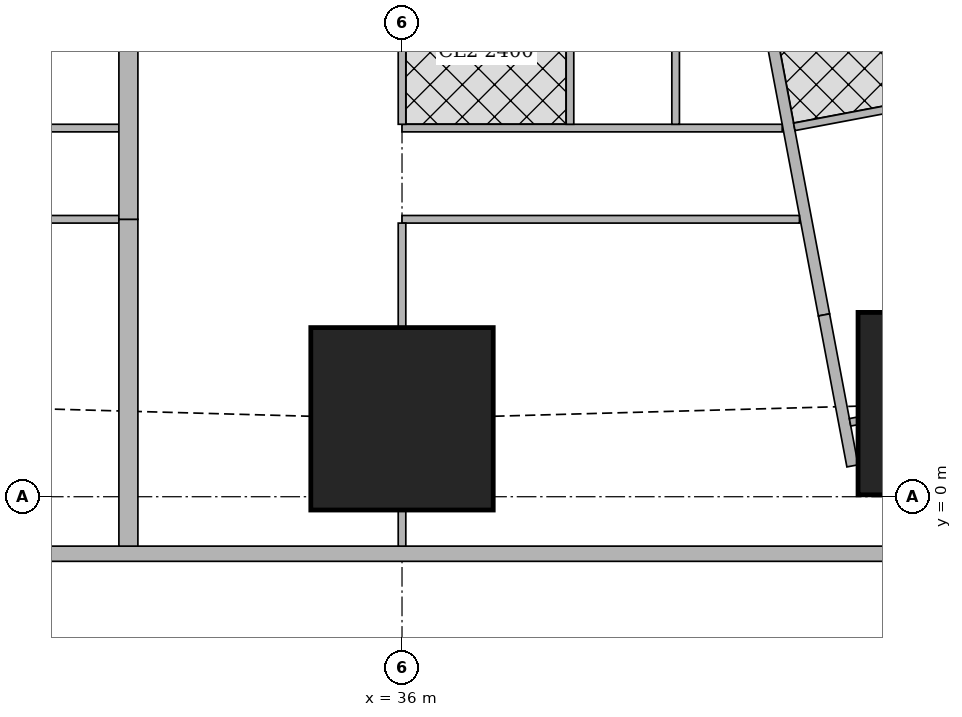
"""IFC4 building model, lengths in metres.
Left out: names, types, materials, properties, quantities, classifications, styles, units other than length and angle.
Written with IfcOpenShell. Run it as: python <this file> out.ifc"""

import sys

from ifc_helpers import new_model, si_unit, direction, frame, frame_2d, origin, origin_2d, place, context, subcontext, project, spatial, rectangle, extrude, element, fill, save


model = new_model("IFC4")
c1 = context("Model", 3, precision=1e-05, world=origin(), true_north=direction((0.0, 1.0)))
c2 = subcontext(c1, "Body", "Model", "MODEL_VIEW")
j1 = project(units=[si_unit("LENGTHUNIT", "METRE"), si_unit("PLANEANGLEUNIT", "RADIAN")], contexts=[c1])
p1 = place(None, origin())
s1 = spatial("IfcSite", under=j1, at=p1, CompositionType="ELEMENT")
p2 = place(p1, origin())
s2 = spatial("IfcBuilding", under=s1, at=p2, CompositionType="ELEMENT")
p3 = place(p2, frame((0.0, 0.0, 216.2)))
s3 = spatial("IfcBuildingStorey", under=s2, at=p3, CompositionType="ELEMENT", Elevation=216.2)
for number, where, z_axis, x_axis in (
    (1, (36.0, 1.025, 0.0), (0.0, 0.0, 1.0), (1.0, 0.0, 0.0)),
    (2, (43.2, 1.225, 0.0), (0.0, 0.0, 1.0), (1.0, 0.0, 0.0)),
):
    element("IfcColumn", number, at=place(p3, frame(where, z_axis=z_axis, x_axis=x_axis)), inside=s3, PredefinedType="COLUMN", context=c2, shape_type="SweptSolid", body=[
        extrude(rectangle(XDim=2.4, YDim=2.4, at=origin_2d()), origin(), (0.0, 0.0, 1.0), 3.75),
    ])
p4 = place(p3, frame((7.363, -0.75, 0.0), z_axis=(0.0, 0.0, 1.0), x_axis=(1.0, 0.0, 0.0)))
e3 = element("IfcWall", 3, at=p4, inside=s3, PredefinedType="SOLIDWALL", context=c2, shape_type="SweptSolid", body=[
    extrude(rectangle(XDim=40.428, YDim=0.2, at=frame_2d((20.214, 0.0))), origin(), (0.0, 0.0, 1.0), 3.5),
])
p5 = place(p4, frame((2.319, 0.0, 0.9)))
e4 = element("IfcOpeningElement", 4, at=p5, cuts=e3, PredefinedType="OPENING", context=c2, shape_type="SweptSolid", body=[
    extrude(rectangle(XDim=2.4, YDim=1.5, at=frame_2d((1.2, 0.75))), frame((0.0, 0.11, 0.0), z_axis=(0.0, -1.0, 0.0), x_axis=(1.0, 0.0, 0.0)), (0.0, 0.0, 1.0), 0.22),
])
p6 = place(p4, frame((7.937, 0.0, 0.9)))
e5 = element("IfcOpeningElement", 5, at=p6, cuts=e3, PredefinedType="OPENING", context=c2, shape_type="SweptSolid", body=[
    extrude(rectangle(XDim=1.8, YDim=1.5, at=frame_2d((0.9, 0.75))), frame((0.0, 0.11, 0.0), z_axis=(0.0, -1.0, 0.0), x_axis=(1.0, 0.0, 0.0)), (0.0, 0.0, 1.0), 0.22),
])
p7 = place(p4, frame((11.537, 0.0, 0.9)))
e6 = element("IfcOpeningElement", 6, at=p7, cuts=e3, PredefinedType="OPENING", context=c2, shape_type="SweptSolid", body=[
    extrude(rectangle(XDim=1.8, YDim=1.5, at=frame_2d((0.9, 0.75))), frame((0.0, 0.11, 0.0), z_axis=(0.0, -1.0, 0.0), x_axis=(1.0, 0.0, 0.0)), (0.0, 0.0, 1.0), 0.22),
])
p8 = place(p4, frame((15.137, 0.0, 0.9)))
e7 = element("IfcOpeningElement", 7, at=p8, cuts=e3, PredefinedType="OPENING", context=c2, shape_type="SweptSolid", body=[
    extrude(rectangle(XDim=1.8, YDim=1.5, at=frame_2d((0.9, 0.75))), frame((0.0, 0.11, 0.0), z_axis=(0.0, -1.0, 0.0), x_axis=(1.0, 0.0, 0.0)), (0.0, 0.0, 1.0), 0.22),
])
p9 = place(p4, frame((18.737, 0.0, 0.9)))
e8 = element("IfcOpeningElement", 8, at=p9, cuts=e3, PredefinedType="OPENING", context=c2, shape_type="SweptSolid", body=[
    extrude(rectangle(XDim=1.8, YDim=1.5, at=frame_2d((0.9, 0.75))), frame((0.0, 0.11, 0.0), z_axis=(0.0, -1.0, 0.0), x_axis=(1.0, 0.0, 0.0)), (0.0, 0.0, 1.0), 0.22),
])
p10 = place(p4, frame((22.337, 0.0, 0.9)))
e9 = element("IfcOpeningElement", 9, at=p10, cuts=e3, PredefinedType="OPENING", context=c2, shape_type="SweptSolid", body=[
    extrude(rectangle(XDim=1.8, YDim=1.5, at=frame_2d((0.9, 0.75))), frame((0.0, 0.11, 0.0), z_axis=(0.0, -1.0, 0.0), x_axis=(1.0, 0.0, 0.0)), (0.0, 0.0, 1.0), 0.22),
])
p11 = place(p4, frame((25.937, 0.0, 0.9)))
e10 = element("IfcOpeningElement", 10, at=p11, cuts=e3, PredefinedType="OPENING", context=c2, shape_type="SweptSolid", body=[
    extrude(rectangle(XDim=1.8, YDim=1.5, at=frame_2d((0.9, 0.75))), frame((0.0, 0.11, 0.0), z_axis=(0.0, -1.0, 0.0), x_axis=(1.0, 0.0, 0.0)), (0.0, 0.0, 1.0), 0.22),
])
p12 = place(p4, frame((29.537, 0.0, 0.9)))
e11 = element("IfcOpeningElement", 11, at=p12, cuts=e3, PredefinedType="OPENING", context=c2, shape_type="SweptSolid", body=[
    extrude(rectangle(XDim=1.8, YDim=1.5, at=frame_2d((0.9, 0.75))), frame((0.0, 0.11, 0.0), z_axis=(0.0, -1.0, 0.0), x_axis=(1.0, 0.0, 0.0)), (0.0, 0.0, 1.0), 0.22),
])
p13 = place(p4, frame((33.137, 0.0, 0.9)))
e12 = element("IfcOpeningElement", 12, at=p13, cuts=e3, PredefinedType="OPENING", context=c2, shape_type="SweptSolid", body=[
    extrude(rectangle(XDim=1.8, YDim=1.5, at=frame_2d((0.9, 0.75))), frame((0.0, 0.11, 0.0), z_axis=(0.0, -1.0, 0.0), x_axis=(1.0, 0.0, 0.0)), (0.0, 0.0, 1.0), 0.22),
])
p14 = place(p3, frame((33.933, 42.73, 0.0), z_axis=(0.0, 0.0, 1.0), x_axis=(0.185595417643, -0.982626246825, 0.0)))
e13 = element("IfcWall", 13, at=p14, inside=s3, PredefinedType="SOLIDWALL", context=c2, shape_type="SweptSolid", body=[
    extrude(rectangle(XDim=41.051, YDim=0.15, at=frame_2d((20.525, 0.0))), origin(), (0.0, 0.0, 1.0), 2.5),
])
p15 = place(p14, frame((12.266, 0.0, 0.0)))
e14 = element("IfcOpeningElement", 14, at=p15, cuts=e13, PredefinedType="OPENING", context=c2, shape_type="SweptSolid", body=[
    extrude(rectangle(XDim=1.0, YDim=2.1, at=frame_2d((0.5, 1.05))), frame((0.0, 0.085, 0.0), z_axis=(0.0, -1.0, 0.0), x_axis=(1.0, 0.0, 0.0)), (0.0, 0.0, 1.0), 0.17),
])
p16 = place(p14, frame((16.082, 0.0, 0.0)))
e15 = element("IfcOpeningElement", 15, at=p16, cuts=e13, PredefinedType="OPENING", context=c2, shape_type="SweptSolid", body=[
    extrude(rectangle(XDim=1.0, YDim=2.1, at=frame_2d((0.5, 1.05))), frame((0.0, 0.085, 0.0), z_axis=(0.0, -1.0, 0.0), x_axis=(1.0, 0.0, 0.0)), (0.0, 0.0, 1.0), 0.17),
])
p17 = place(p14, frame((24.369, 0.0, 0.0)))
e16 = element("IfcOpeningElement", 16, at=p17, cuts=e13, PredefinedType="OPENING", context=c2, shape_type="SweptSolid", body=[
    extrude(rectangle(XDim=1.0, YDim=2.1, at=frame_2d((0.5, 1.05))), frame((0.0, 0.085, 0.0), z_axis=(0.0, -1.0, 0.0), x_axis=(1.0, 0.0, 0.0)), (0.0, 0.0, 1.0), 0.17),
])
p18 = place(p14, frame((30.862, 0.0, 0.0)))
e17 = element("IfcOpeningElement", 17, at=p18, cuts=e13, PredefinedType="OPENING", context=c2, shape_type="SweptSolid", body=[
    extrude(rectangle(XDim=1.0, YDim=2.1, at=frame_2d((0.5, 1.05))), frame((0.0, 0.085, 0.0), z_axis=(0.0, -1.0, 0.0), x_axis=(1.0, 0.0, 0.0)), (0.0, 0.0, 1.0), 0.17),
])
p19 = place(p3, frame((41.552, 2.392, 0.0), z_axis=(0.0, 0.0, 1.0), x_axis=(0.185535500323, -0.982637561932, 0.0)))
e18 = element("IfcWall", 18, at=p19, inside=s3, PredefinedType="SOLIDWALL", context=c2, shape_type="SweptSolid", body=[
    extrude(rectangle(XDim=2.021, YDim=0.15, at=frame_2d((1.011, 0.0))), origin(), (0.0, 0.0, 1.0), 2.05),
])
p20 = place(p3, frame((32.275, 3.65, 0.0), z_axis=(0.0, 0.0, 1.0), x_axis=(-1.0, 0.0, 0.0)))
e19 = element("IfcWall", 19, at=p20, inside=s3, PredefinedType="PARTITIONING", context=c2, shape_type="SweptSolid", body=[
    extrude(rectangle(XDim=3.475, YDim=0.1, at=frame_2d((1.737, 0.0))), origin(), (0.0, 0.0, 1.0), 3.5),
])
p21 = place(p20, frame((1.35, 0.0, 0.0)))
e20 = element("IfcOpeningElement", 20, at=p21, cuts=e19, PredefinedType="OPENING", context=c2, shape_type="SweptSolid", body=[
    extrude(rectangle(XDim=0.9, YDim=2.1, at=frame_2d((0.45, 1.05))), frame((0.0, 0.06, 0.0), z_axis=(0.0, -1.0, 0.0), x_axis=(1.0, 0.0, 0.0)), (0.0, 0.0, 1.0), 0.12),
])
p22 = place(p3, frame((32.275, 4.85, 0.0), z_axis=(0.0, 0.0, 1.0), x_axis=(-1.0, 0.0, 0.0)))
e21 = element("IfcWall", 21, at=p22, inside=s3, PredefinedType="PARTITIONING", context=c2, shape_type="SweptSolid", body=[
    extrude(rectangle(XDim=3.475, YDim=0.1, at=frame_2d((1.737, 0.0))), origin(), (0.0, 0.0, 1.0), 3.5),
])
p23 = place(p22, frame((1.92, 0.0, 0.0)))
e22 = element("IfcOpeningElement", 22, at=p23, cuts=e21, PredefinedType="OPENING", context=c2, shape_type="SweptSolid", body=[
    extrude(rectangle(XDim=0.9, YDim=2.1, at=frame_2d((0.45, 1.05))), frame((0.0, 0.06, 0.0), z_axis=(0.0, -1.0, 0.0), x_axis=(1.0, 0.0, 0.0)), (0.0, 0.0, 1.0), 0.12),
])
p24 = place(p22, frame((0.15, 0.0, 0.0)))
e23 = element("IfcOpeningElement", 23, at=p24, cuts=e21, PredefinedType="OPENING", context=c2, shape_type="SweptSolid", body=[
    extrude(rectangle(XDim=0.9, YDim=2.1, at=frame_2d((0.45, 1.05))), frame((0.0, 0.06, 0.0), z_axis=(0.0, -1.0, 0.0), x_axis=(1.0, 0.0, 0.0)), (0.0, 0.0, 1.0), 0.12),
])
p25 = place(p3, frame((41.229, 3.65, 0.0), z_axis=(0.0, 0.0, 1.0), x_axis=(-1.0, 0.0, 0.0)))
e24 = element("IfcWall", 24, at=p25, inside=s3, PredefinedType="PARTITIONING", context=c2, shape_type="SweptSolid", body=[
    extrude(rectangle(XDim=5.229, YDim=0.1, at=frame_2d((2.615, 0.0))), origin(), (0.0, 0.0, 1.0), 3.5),
])
p26 = place(p25, frame((4.129, 0.0, 0.0)))
e25 = element("IfcOpeningElement", 25, at=p26, cuts=e24, PredefinedType="OPENING", context=c2, shape_type="SweptSolid", body=[
    extrude(rectangle(XDim=0.9, YDim=2.1, at=frame_2d((0.45, 1.05))), frame((0.0, 0.06, 0.0), z_axis=(0.0, -1.0, 0.0), x_axis=(1.0, 0.0, 0.0)), (0.0, 0.0, 1.0), 0.12),
])
p27 = place(p3, frame((41.002, 4.85, 0.0), z_axis=(0.0, 0.0, 1.0), x_axis=(-1.0, 0.0, 0.0)))
e26 = element("IfcWall", 26, at=p27, inside=s3, PredefinedType="PARTITIONING", context=c2, shape_type="SweptSolid", body=[
    extrude(rectangle(XDim=5.002, YDim=0.1, at=frame_2d((2.501, 0.0))), origin(), (0.0, 0.0, 1.0), 3.5),
])
p28 = place(p27, frame((3.447, 0.0, 0.0)))
e27 = element("IfcOpeningElement", 27, at=p28, cuts=e26, PredefinedType="OPENING", context=c2, shape_type="SweptSolid", body=[
    extrude(rectangle(XDim=0.9, YDim=2.1, at=frame_2d((0.45, 1.05))), frame((0.0, 0.06, 0.0), z_axis=(0.0, -1.0, 0.0), x_axis=(1.0, 0.0, 0.0)), (0.0, 0.0, 1.0), 0.12),
])
p29 = place(p27, frame((0.15, 0.0, 0.0)))
e28 = element("IfcOpeningElement", 28, at=p29, cuts=e26, PredefinedType="OPENING", context=c2, shape_type="SweptSolid", body=[
    extrude(rectangle(XDim=0.9, YDim=2.1, at=frame_2d((0.45, 1.05))), frame((0.0, 0.06, 0.0), z_axis=(0.0, -1.0, 0.0), x_axis=(1.0, 0.0, 0.0)), (0.0, 0.0, 1.0), 0.12),
])
p30 = place(p27, frame((1.647, 0.0, 0.0)))
e29 = element("IfcOpeningElement", 29, at=p30, cuts=e26, PredefinedType="OPENING", context=c2, shape_type="SweptSolid", body=[
    extrude(rectangle(XDim=0.9, YDim=2.1, at=frame_2d((0.45, 1.05))), frame((0.0, 0.06, 0.0), z_axis=(0.0, -1.0, 0.0), x_axis=(1.0, 0.0, 0.0)), (0.0, 0.0, 1.0), 0.12),
])
p31 = place(p3, frame((36.0, -0.65, 0.0), z_axis=(0.0, 0.0, 1.0), x_axis=(0.0, 1.0, 0.0)))
e30 = element("IfcWall", 30, at=p31, inside=s3, PredefinedType="PARTITIONING", context=c2, shape_type="SweptSolid", body=[
    extrude(rectangle(XDim=0.474, YDim=0.1, at=frame_2d((0.237, 0.0))), origin(), (0.0, 0.0, 1.0), 3.5),
])
p32 = place(p3, frame((36.0, 2.226, 0.0), z_axis=(0.0, 0.0, 1.0), x_axis=(0.0, 1.0, 0.0)))
e31 = element("IfcWall", 31, at=p32, inside=s3, PredefinedType="PARTITIONING", context=c2, shape_type="SweptSolid", body=[
    extrude(rectangle(XDim=1.374, YDim=0.1, at=frame_2d((0.687, 0.0))), origin(), (0.0, 0.0, 1.0), 3.5),
])
p33 = place(p3, frame((36.0, 4.9, 0.0), z_axis=(0.0, 0.0, 1.0), x_axis=(0.0, 1.0, 0.0)))
e32 = element("IfcWall", 32, at=p33, inside=s3, PredefinedType="PARTITIONING", context=c2, shape_type="SweptSolid", body=[
    extrude(rectangle(XDim=1.899, YDim=0.1, at=frame_2d((0.95, 0.0))), origin(), (0.0, 0.0, 1.0), 3.5),
])
for number, where, z_axis, x_axis in (
    (33, (39.6, 4.9, 0.0), (0.0, 0.0, 1.0), (0.0, 1.0, 0.0)),
    (34, (38.21, 4.9, 0.0), (0.0, 0.0, 1.0), (0.0, 1.0, 0.0)),
):
    element("IfcWall", number, at=place(p3, frame(where, z_axis=z_axis, x_axis=x_axis)), inside=s3, PredefinedType="PARTITIONING", context=c2, shape_type="SweptSolid", body=[
        extrude(rectangle(XDim=3.275, YDim=0.1, at=frame_2d((1.638, 0.0))), origin(), (0.0, 0.0, 1.0), 3.5),
    ])
p34 = place(p3, frame((32.4, -0.65, 0.0), z_axis=(0.0, 0.0, 1.0), x_axis=(0.0, 1.0, 0.0)))
e35 = element("IfcWall", 35, at=p34, inside=s3, PredefinedType="SOLIDWALL", context=c2, shape_type="SweptSolid", body=[
    extrude(rectangle(XDim=4.3, YDim=0.25, at=frame_2d((2.15, 0.0))), origin(), (0.0, 0.0, 1.0), 2.05),
])
p35 = place(p3, frame((32.4, 3.65, 0.0), z_axis=(0.0, 0.0, 1.0), x_axis=(0.0, 1.0, 0.0)))
e36 = element("IfcWall", 36, at=p35, inside=s3, PredefinedType="SOLIDWALL", context=c2, shape_type="SweptSolid", body=[
    extrude(rectangle(XDim=4.525, YDim=0.25, at=frame_2d((2.263, 0.0))), origin(), (0.0, 0.0, 1.0), 3.5),
])
p36 = place(p3, frame((41.99, 0.997, 0.0), z_axis=(0.0, 0.0, 1.0), x_axis=(-0.982382747416, -0.186880008506, 0.0)))
e37 = element("IfcWall", 37, at=p36, inside=s3, PredefinedType="PARTITIONING", context=c2, shape_type="SweptSolid", body=[
    extrude(rectangle(XDim=0.097, YDim=0.1, at=frame_2d((0.048, 0.0))), origin(), (0.0, 0.0, 1.0), 2.05),
])
p37 = place(p3, frame((44.379, 5.474, 0.0), z_axis=(0.0, 0.0, 1.0), x_axis=(-0.982607026909, -0.185697147715, 0.0)))
e38 = element("IfcWall", 38, at=p37, inside=s3, PredefinedType="PARTITIONING", context=c2, shape_type="SweptSolid", body=[
    extrude(rectangle(XDim=3.275, YDim=0.1, at=frame_2d((1.637, 0.0))), origin(), (0.0, 0.0, 1.0), 3.5),
])
p38 = place(p10, origin())
e39 = element("IfcWindow", 39, at=p38, inside=s3, PartitioningType="SINGLE_PANEL", PredefinedType="WINDOW", context=c2, shape_type="SweptSolid", body=[
    extrude(rectangle(XDim=1.8, YDim=1.5, at=frame_2d((0.9, 0.75))), frame((0.0, 0.03, 0.0), z_axis=(0.0, -1.0, 0.0), x_axis=(1.0, 0.0, 0.0)), (0.0, 0.0, 1.0), 0.06),
])
fill(e9, e39)
p39 = place(p11, origin())
e40 = element("IfcWindow", 40, at=p39, inside=s3, PartitioningType="SINGLE_PANEL", PredefinedType="WINDOW", context=c2, shape_type="SweptSolid", body=[
    extrude(rectangle(XDim=1.8, YDim=1.5, at=frame_2d((0.9, 0.75))), frame((0.0, 0.03, 0.0), z_axis=(0.0, -1.0, 0.0), x_axis=(1.0, 0.0, 0.0)), (0.0, 0.0, 1.0), 0.06),
])
fill(e10, e40)
p40 = place(p12, origin())
e41 = element("IfcWindow", 41, at=p40, inside=s3, PartitioningType="SINGLE_PANEL", PredefinedType="WINDOW", context=c2, shape_type="SweptSolid", body=[
    extrude(rectangle(XDim=1.8, YDim=1.5, at=frame_2d((0.9, 0.75))), frame((0.0, 0.03, 0.0), z_axis=(0.0, -1.0, 0.0), x_axis=(1.0, 0.0, 0.0)), (0.0, 0.0, 1.0), 0.06),
])
fill(e11, e41)
p41 = place(p13, origin())
e42 = element("IfcWindow", 42, at=p41, inside=s3, PartitioningType="SINGLE_PANEL", PredefinedType="WINDOW", context=c2, shape_type="SweptSolid", body=[
    extrude(rectangle(XDim=1.8, YDim=1.5, at=frame_2d((0.9, 0.75))), frame((0.0, 0.03, 0.0), z_axis=(0.0, -1.0, 0.0), x_axis=(1.0, 0.0, 0.0)), (0.0, 0.0, 1.0), 0.06),
])
fill(e12, e42)
p42 = place(p24, origin())
e43 = element("IfcDoor", 43, at=p42, inside=s3, OperationType="SINGLE_SWING_RIGHT", PredefinedType="DOOR", context=c2, shape_type="SweptSolid", body=[
    extrude(rectangle(XDim=0.9, YDim=2.1, at=frame_2d((0.45, 1.05))), frame((0.0, 0.025, 0.0), z_axis=(0.0, -1.0, 0.0), x_axis=(1.0, 0.0, 0.0)), (0.0, 0.0, 1.0), 0.05),
])
fill(e23, e43)
p43 = place(p26, origin())
e44 = element("IfcDoor", 44, at=p43, inside=s3, OperationType="SINGLE_SWING_LEFT", PredefinedType="DOOR", context=c2, shape_type="SweptSolid", body=[
    extrude(rectangle(XDim=0.9, YDim=2.1, at=frame_2d((0.45, 1.05))), frame((0.0, 0.025, 0.0), z_axis=(0.0, -1.0, 0.0), x_axis=(1.0, 0.0, 0.0)), (0.0, 0.0, 1.0), 0.05),
])
fill(e25, e44)
p44 = place(p28, origin())
e45 = element("IfcDoor", 45, at=p44, inside=s3, OperationType="SINGLE_SWING_LEFT", PredefinedType="DOOR", context=c2, shape_type="SweptSolid", body=[
    extrude(rectangle(XDim=0.9, YDim=2.1, at=frame_2d((0.45, 1.05))), frame((0.0, 0.025, 0.0), z_axis=(0.0, -1.0, 0.0), x_axis=(1.0, 0.0, 0.0)), (0.0, 0.0, 1.0), 0.05),
])
fill(e27, e45)
p45 = place(p29, origin())
e46 = element("IfcDoor", 46, at=p45, inside=s3, OperationType="SINGLE_SWING_RIGHT", PredefinedType="DOOR", context=c2, shape_type="SweptSolid", body=[
    extrude(rectangle(XDim=0.9, YDim=2.1, at=frame_2d((0.45, 1.05))), frame((0.0, 0.025, 0.0), z_axis=(0.0, -1.0, 0.0), x_axis=(1.0, 0.0, 0.0)), (0.0, 0.0, 1.0), 0.05),
])
fill(e28, e46)
p46 = place(p30, origin())
e47 = element("IfcDoor", 47, at=p46, inside=s3, OperationType="SINGLE_SWING_RIGHT", PredefinedType="DOOR", context=c2, shape_type="SweptSolid", body=[
    extrude(rectangle(XDim=0.9, YDim=2.1, at=frame_2d((0.45, 1.05))), frame((0.0, 0.025, 0.0), z_axis=(0.0, -1.0, 0.0), x_axis=(1.0, 0.0, 0.0)), (0.0, 0.0, 1.0), 0.05),
])
fill(e29, e47)
save(model, sys.argv[1])
